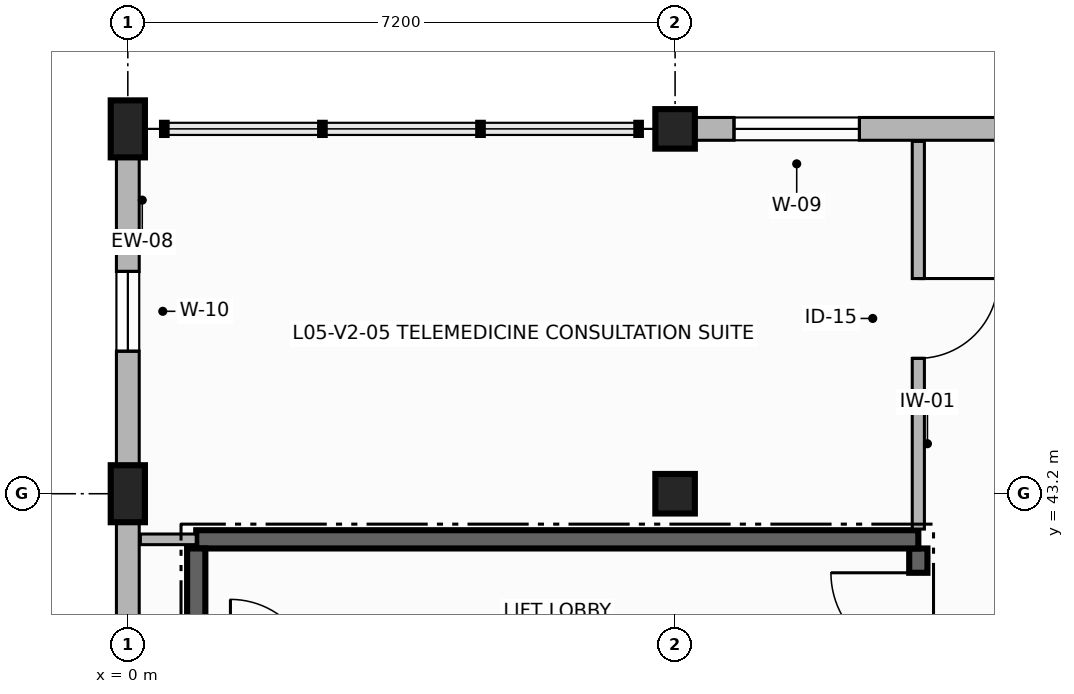
"""IFC4 building model, lengths in metres.
Left out: names, types, materials, properties, quantities, classifications, styles, units other than length and angle.
Written with IfcOpenShell. Run it as: python <this file> out.ifc"""

import sys

from ifc_helpers import new_model, si_unit, direction, frame, frame_2d, origin, origin_2d, place, context, subcontext, project, spatial, rectangle, extrude, element, fill, save


model = new_model("IFC4")
c1 = context("Model", 3, precision=1e-05, world=origin(), true_north=direction((0.0, 1.0)))
c2 = subcontext(c1, "Body", "Model", "MODEL_VIEW")
j1 = project(units=[si_unit("LENGTHUNIT", "METRE"), si_unit("PLANEANGLEUNIT", "RADIAN")], contexts=[c1])
p1 = place(None, origin())
s1 = spatial("IfcSite", under=j1, at=p1, CompositionType="ELEMENT")
p2 = place(p1, origin())
s2 = spatial("IfcBuilding", under=s1, at=p2, CompositionType="ELEMENT")
p3 = place(p2, frame((0.0, 0.0, 19.7)))
s3 = spatial("IfcBuildingStorey", under=s2, at=p3, CompositionType="ELEMENT", Elevation=19.7)
for number, where, z_axis, x_axis in (
    (1, (0.0, 43.2, 0.0), (0.0, 0.0, 1.0), (1.0, 0.0, 0.0)),
    (2, (0.0, 48.0, 0.0), (0.0, 0.0, 1.0), (1.0, 0.0, 0.0)),
):
    element("IfcColumn", number, at=place(p3, frame(where, z_axis=z_axis, x_axis=x_axis)), inside=s3, PredefinedType="PILASTER", context=c2, shape_type="SweptSolid", body=[
        extrude(rectangle(XDim=0.45, YDim=0.75, at=origin_2d()), origin(), (0.0, 0.0, 1.0), 3.42),
    ])
for number, where, z_axis, x_axis in (
    (3, (7.2, 43.2, 0.0), (0.0, 0.0, 1.0), (1.0, 0.0, 0.0)),
    (4, (7.2, 48.0, 0.0), (0.0, 0.0, 1.0), (1.0, 0.0, 0.0)),
):
    element("IfcColumn", number, at=place(p3, frame(where, z_axis=z_axis, x_axis=x_axis)), inside=s3, PredefinedType="COLUMN", context=c2, shape_type="SweptSolid", body=[
        extrude(rectangle(XDim=0.52, YDim=0.52, at=origin_2d()), origin(), (0.0, 0.0, 1.0), 3.42),
    ])
p4 = place(p3, frame((14.4, 48.0, 0.0), z_axis=(0.0, 0.0, 1.0), x_axis=(-1.0, 0.0, 0.0)))
e5 = element("IfcWall", 5, at=p4, inside=s3, PredefinedType="SOLIDWALL", context=c2, shape_type="SweptSolid", body=[
    extrude(rectangle(XDim=7.2, YDim=0.3, at=frame_2d((3.6, 0.0))), origin(), (0.0, 0.0, 1.0), 2.8),
])
p5 = place(p4, frame((4.775, 0.0, 0.85)))
e6 = element("IfcOpeningElement", 6, at=p5, cuts=e5, PredefinedType="OPENING", context=c2, shape_type="SweptSolid", body=[
    extrude(rectangle(XDim=1.65, YDim=1.75, at=frame_2d((0.825, 0.875))), frame((0.0, 0.16, 0.0), z_axis=(0.0, -1.0, 0.0), x_axis=(1.0, 0.0, 0.0)), (0.0, 0.0, 1.0), 0.32),
])
p6 = place(p3, frame((0.0, 48.0, 0.0), z_axis=(0.0, 0.0, 1.0), x_axis=(0.0, -1.0, 0.0)))
e7 = element("IfcWall", 7, at=p6, inside=s3, PredefinedType="SOLIDWALL", context=c2, shape_type="SweptSolid", body=[
    extrude(rectangle(XDim=4.8, YDim=0.3, at=frame_2d((2.4, 0.0))), origin(), (0.0, 0.0, 1.0), 2.8),
])
p7 = place(p6, frame((1.875, 0.0, 0.85)))
e8 = element("IfcOpeningElement", 8, at=p7, cuts=e7, PredefinedType="OPENING", context=c2, shape_type="SweptSolid", body=[
    extrude(rectangle(XDim=1.05, YDim=1.7, at=frame_2d((0.525, 0.85))), frame((0.0, 0.16, 0.0), z_axis=(0.0, -1.0, 0.0), x_axis=(1.0, 0.0, 0.0)), (0.0, 0.0, 1.0), 0.32),
])
p8 = place(p3, frame((0.0, 43.2, 0.0), z_axis=(0.0, 0.0, 1.0), x_axis=(0.0, -1.0, 0.0)))
e9 = element("IfcWall", 9, at=p8, inside=s3, PredefinedType="SOLIDWALL", context=c2, shape_type="SweptSolid", body=[
    extrude(rectangle(XDim=7.2, YDim=0.3, at=frame_2d((3.6, 0.0))), origin(), (0.0, 0.0, 1.0), 2.8),
])
p9 = place(p8, frame((2.775, 0.0, 0.85)))
e10 = element("IfcOpeningElement", 10, at=p9, cuts=e9, PredefinedType="OPENING", context=c2, shape_type="SweptSolid", body=[
    extrude(rectangle(XDim=1.45, YDim=1.75, at=frame_2d((0.725, 0.875))), frame((0.0, 0.16, 0.0), z_axis=(0.0, -1.0, 0.0), x_axis=(1.0, 0.0, 0.0)), (0.0, 0.0, 1.0), 0.32),
])
p10 = place(p3, frame((10.4, 36.92, 0.0), z_axis=(0.0, 0.0, 1.0), x_axis=(0.0, 1.0, 0.0)))
e11 = element("IfcWall", 11, at=p10, inside=s3, PredefinedType="SHEAR", context=c2, shape_type="SweptSolid", body=[
    extrude(rectangle(XDim=5.56, YDim=0.24, at=frame_2d((2.78, 0.0))), origin(), (0.0, 0.0, 1.0), 3.42),
])
p11 = place(p10, frame((4.09, 0.0, 0.0)))
e12 = element("IfcOpeningElement", 12, at=p11, cuts=e11, PredefinedType="OPENING", context=c2, shape_type="SweptSolid", body=[
    extrude(rectangle(XDim=1.15, YDim=2.2, at=frame_2d((0.575, 1.1))), frame((0.0, 0.13, 0.0), z_axis=(0.0, -1.0, 0.0), x_axis=(1.0, 0.0, 0.0)), (0.0, 0.0, 1.0), 0.26),
])
p12 = place(p3, frame((10.4, 42.6, 0.0), z_axis=(0.0, 0.0, 1.0), x_axis=(-1.0, 0.0, 0.0)))
e13 = element("IfcWall", 13, at=p12, inside=s3, PredefinedType="SHEAR", context=c2, shape_type="SweptSolid", body=[
    extrude(rectangle(XDim=9.5, YDim=0.24, at=frame_2d((4.75, 0.0))), origin(), (0.0, 0.0, 1.0), 3.42),
])
p13 = place(p3, frame((0.9, 42.48, 0.0), z_axis=(0.0, 0.0, 1.0), x_axis=(0.0, -1.0, 0.0)))
e14 = element("IfcWall", 14, at=p13, inside=s3, PredefinedType="SHEAR", context=c2, shape_type="SweptSolid", body=[
    extrude(rectangle(XDim=5.56, YDim=0.24, at=frame_2d((2.78, 0.0))), origin(), (0.0, 0.0, 1.0), 3.42),
])
p14 = place(p3, frame((10.4, 47.835, 0.0), z_axis=(0.0, 0.0, 1.0), x_axis=(0.0, -1.0, 0.0)))
e15 = element("IfcWall", 15, at=p14, inside=s3, PredefinedType="PARTITIONING", context=c2, shape_type="SweptSolid", body=[
    extrude(rectangle(XDim=5.1, YDim=0.16, at=frame_2d((2.55, 0.0))), origin(), (0.0, 0.0, 1.0), 2.78),
])
p15 = place(p14, frame((1.804, 0.0, 0.0)))
e16 = element("IfcOpeningElement", 16, at=p15, cuts=e15, PredefinedType="OPENING", context=c2, shape_type="SweptSolid", body=[
    extrude(rectangle(XDim=1.05, YDim=2.2, at=frame_2d((0.525, 1.1))), frame((0.0, 0.09, 0.0), z_axis=(0.0, -1.0, 0.0), x_axis=(1.0, 0.0, 0.0)), (0.0, 0.0, 1.0), 0.18),
])
p16 = place(p3, frame((0.9, 42.6, 0.0), z_axis=(0.0, 0.0, 1.0), x_axis=(-1.0, 0.0, 0.0)))
e17 = element("IfcWall", 17, at=p16, inside=s3, PredefinedType="PARTITIONING", context=c2, shape_type="SweptSolid", body=[
    extrude(rectangle(XDim=0.735, YDim=0.14, at=frame_2d((0.367, 0.0))), origin(), (0.0, 0.0, 1.0), 2.78),
])
p17 = place(p5, origin())
e18 = element("IfcWindow", 18, at=p17, inside=s3, PartitioningType="SINGLE_PANEL", PredefinedType="WINDOW", context=c2, shape_type="SweptSolid", body=[
    extrude(rectangle(XDim=1.65, YDim=1.75, at=frame_2d((0.825, 0.875))), frame((0.0, 0.03, 0.0), z_axis=(0.0, -1.0, 0.0), x_axis=(1.0, 0.0, 0.0)), (0.0, 0.0, 1.0), 0.06),
])
fill(e6, e18)
p18 = place(p7, origin())
e19 = element("IfcWindow", 19, at=p18, inside=s3, PartitioningType="SINGLE_PANEL", PredefinedType="WINDOW", context=c2, shape_type="SweptSolid", body=[
    extrude(rectangle(XDim=1.05, YDim=1.7, at=frame_2d((0.525, 0.85))), frame((0.0, 0.03, 0.0), z_axis=(0.0, -1.0, 0.0), x_axis=(1.0, 0.0, 0.0)), (0.0, 0.0, 1.0), 0.06),
])
fill(e8, e19)
p19 = place(p11, origin())
e20 = element("IfcDoor", 20, at=p19, inside=s3, OperationType="SINGLE_SWING_RIGHT", PredefinedType="DOOR", context=c2, shape_type="SweptSolid", body=[
    extrude(rectangle(XDim=1.15, YDim=2.2, at=frame_2d((0.575, 1.1))), frame((0.0, 0.025, 0.0), z_axis=(0.0, -1.0, 0.0), x_axis=(1.0, 0.0, 0.0)), (0.0, 0.0, 1.0), 0.05),
])
fill(e12, e20)
p20 = place(p15, origin())
e21 = element("IfcDoor", 21, at=p20, inside=s3, OperationType="SINGLE_SWING_LEFT", PredefinedType="DOOR", context=c2, shape_type="SweptSolid", body=[
    extrude(rectangle(XDim=1.05, YDim=2.2, at=frame_2d((0.525, 1.1))), frame((0.0, 0.025, 0.0), z_axis=(0.0, -1.0, 0.0), x_axis=(1.0, 0.0, 0.0)), (0.0, 0.0, 1.0), 0.05),
])
fill(e16, e21)
save(model, sys.argv[1])
